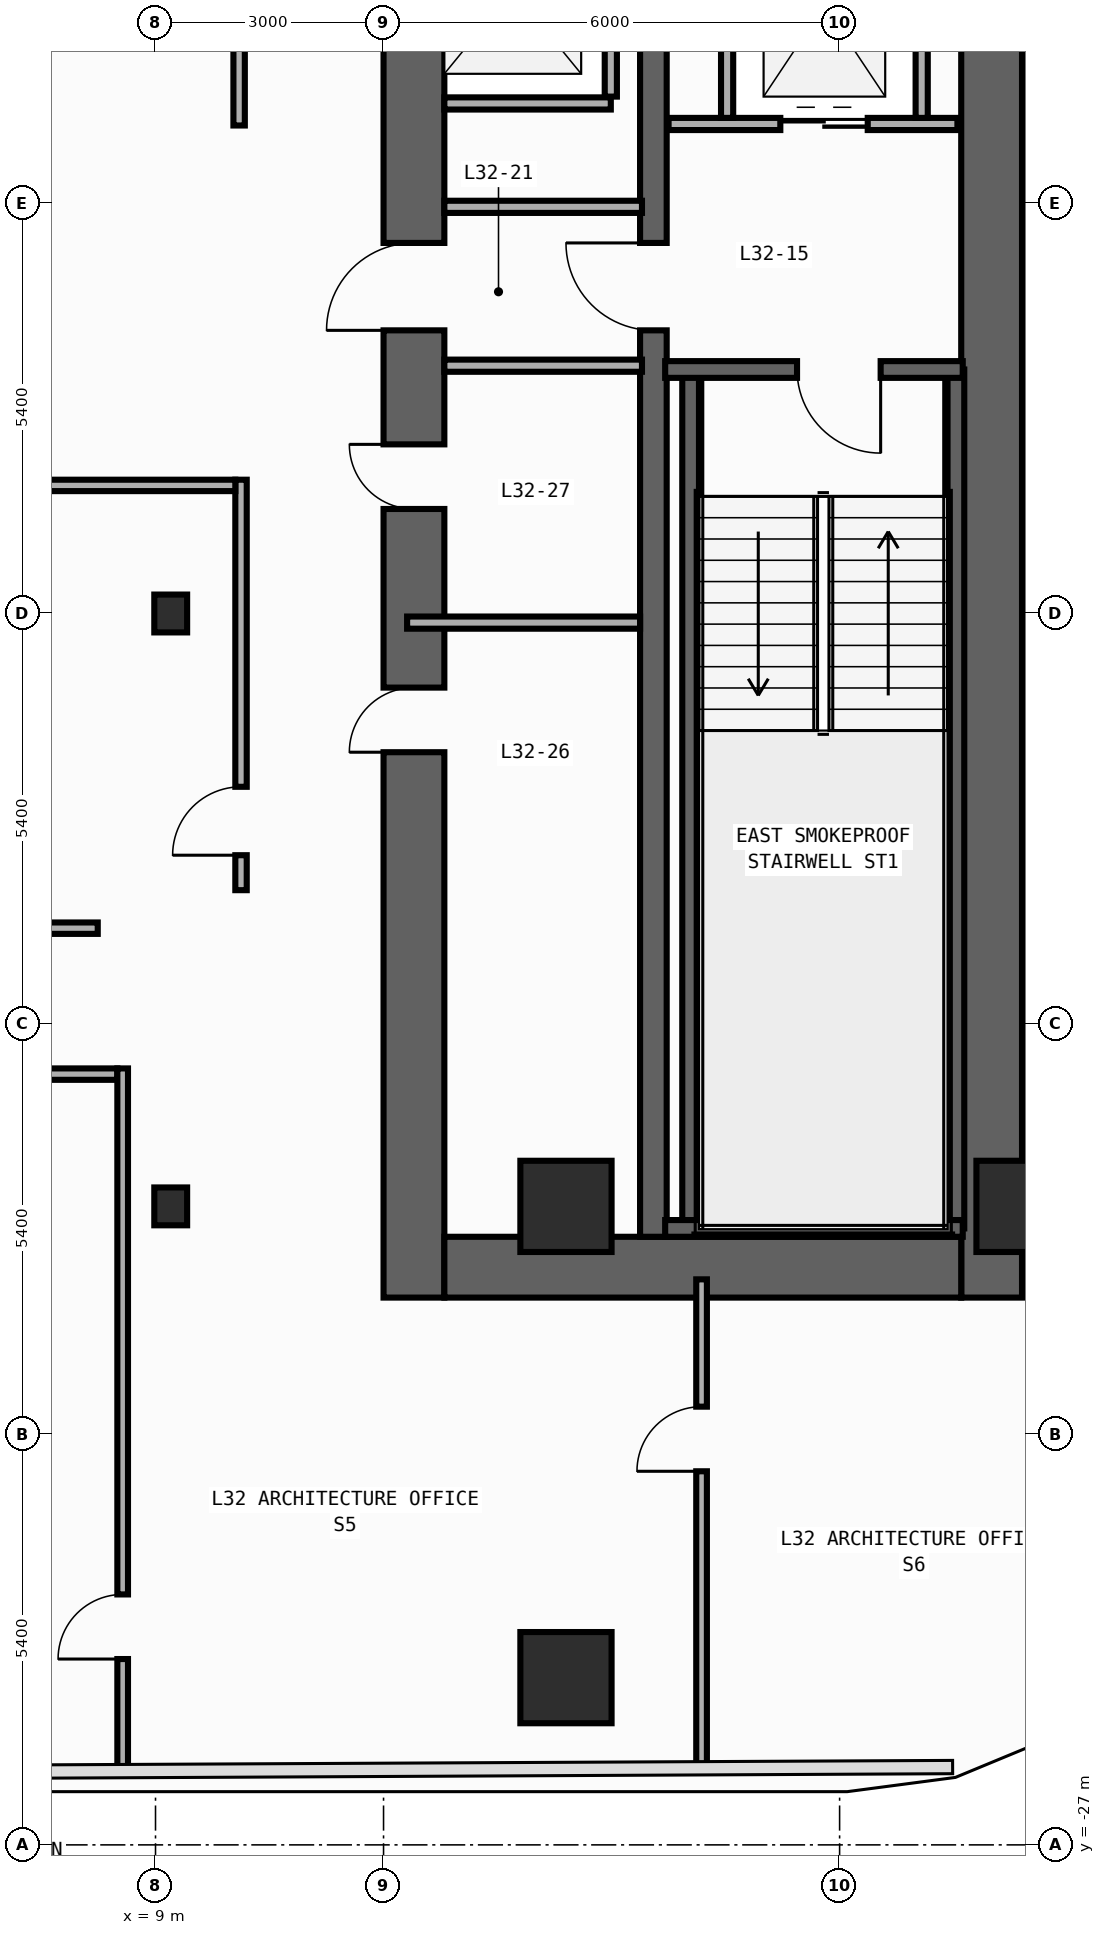
"""IFC4 building model, lengths in metres.
Left out: names, types, materials, properties, quantities, classifications, styles, units other than length and angle.
Written with IfcOpenShell. Run it as: python <this file> out.ifc"""

import sys

from ifc_helpers import new_model, si_unit, direction, frame, frame_2d, origin, origin_2d, place, context, subcontext, project, spatial, rectangle, i_section, extrude, element, fill, save


model = new_model("IFC4")
c1 = context("Model", 3, precision=1e-05, world=origin(), true_north=direction((0.0, 1.0)))
c2 = subcontext(c1, "Body", "Model", "MODEL_VIEW")
j1 = project(units=[si_unit("LENGTHUNIT", "METRE"), si_unit("PLANEANGLEUNIT", "RADIAN")], contexts=[c1])
p1 = place(None, origin())
s1 = spatial("IfcSite", under=j1, at=p1, CompositionType="ELEMENT")
p2 = place(p1, origin())
s2 = spatial("IfcBuilding", under=s1, at=p2, CompositionType="ELEMENT")
p3 = place(p2, frame((0.0, 0.0, 139.4)))
s3 = spatial("IfcBuildingStorey", under=s2, at=p3, CompositionType="ELEMENT", Elevation=139.4)
p4 = place(p3, frame((12.4, -19.8, 0.0), z_axis=(0.0, 0.0, 1.0), x_axis=(0.0, 1.0, 0.0)))
e1 = element("IfcWall", 1, at=p4, inside=s3, PredefinedType="SHEAR", context=c2, shape_type="SweptSolid", body=[
    extrude(rectangle(XDim=27.0, YDim=0.8, at=frame_2d((13.5, 0.0))), origin(), (0.0, 0.0, 1.0), 3.94),
])
p5 = place(p4, frame((23.05, 0.0, 0.0)))
e2 = element("IfcOpeningElement", 2, at=p5, cuts=e1, PredefinedType="OPENING", context=c2, shape_type="SweptSolid", body=[
    extrude(rectangle(XDim=1.1, YDim=2.2, at=frame_2d((0.55, 1.1))), frame((0.0, 0.41, 0.0), z_axis=(0.0, -1.0, 0.0), x_axis=(1.0, 0.0, 0.0)), (0.0, 0.0, 1.0), 0.82),
])
p6 = place(p4, frame((19.85, 0.0, 0.0)))
e3 = element("IfcOpeningElement", 3, at=p6, cuts=e1, PredefinedType="OPENING", context=c2, shape_type="SweptSolid", body=[
    extrude(rectangle(XDim=1.1, YDim=2.2, at=frame_2d((0.55, 1.1))), frame((0.0, 0.41, 0.0), z_axis=(0.0, -1.0, 0.0), x_axis=(1.0, 0.0, 0.0)), (0.0, 0.0, 1.0), 0.82),
])
p7 = place(p4, frame((16.65, 0.0, 0.0)))
e4 = element("IfcOpeningElement", 4, at=p7, cuts=e1, PredefinedType="OPENING", context=c2, shape_type="SweptSolid", body=[
    extrude(rectangle(XDim=1.1, YDim=2.2, at=frame_2d((0.55, 1.1))), frame((0.0, 0.41, 0.0), z_axis=(0.0, -1.0, 0.0), x_axis=(1.0, 0.0, 0.0)), (0.0, 0.0, 1.0), 0.82),
])
p8 = place(p4, frame((7.175, 0.0, 0.0)))
e5 = element("IfcOpeningElement", 5, at=p8, cuts=e1, PredefinedType="OPENING", context=c2, shape_type="SweptSolid", body=[
    extrude(rectangle(XDim=0.85, YDim=2.1, at=frame_2d((0.425, 1.05))), frame((0.0, 0.41, 0.0), z_axis=(0.0, -1.0, 0.0), x_axis=(1.0, 0.0, 0.0)), (0.0, 0.0, 1.0), 0.82),
])
p9 = place(p4, frame((10.375, 0.0, 0.0)))
e6 = element("IfcOpeningElement", 6, at=p9, cuts=e1, PredefinedType="OPENING", context=c2, shape_type="SweptSolid", body=[
    extrude(rectangle(XDim=0.85, YDim=2.1, at=frame_2d((0.425, 1.05))), frame((0.0, 0.41, 0.0), z_axis=(0.0, -1.0, 0.0), x_axis=(1.0, 0.0, 0.0)), (0.0, 0.0, 1.0), 0.82),
])
p10 = place(p4, frame((12.725, 0.0, 0.0)))
e7 = element("IfcOpeningElement", 7, at=p10, cuts=e1, PredefinedType="OPENING", context=c2, shape_type="SweptSolid", body=[
    extrude(rectangle(XDim=1.15, YDim=2.2, at=frame_2d((0.575, 1.1))), frame((0.0, 0.41, 0.0), z_axis=(0.0, -1.0, 0.0), x_axis=(1.0, 0.0, 0.0)), (0.0, 0.0, 1.0), 0.82),
])
p11 = place(p4, frame((25.125, 0.0, 0.0)))
e8 = element("IfcOpeningElement", 8, at=p11, cuts=e1, PredefinedType="OPENING", context=c2, shape_type="SweptSolid", body=[
    extrude(rectangle(XDim=0.85, YDim=2.1, at=frame_2d((0.425, 1.05))), frame((0.0, 0.41, 0.0), z_axis=(0.0, -1.0, 0.0), x_axis=(1.0, 0.0, 0.0)), (0.0, 0.0, 1.0), 0.82),
])
p12 = place(p3, frame((20.0, -19.8, 0.0), z_axis=(0.0, 0.0, 1.0), x_axis=(0.0, 1.0, 0.0)))
e9 = element("IfcWall", 9, at=p12, inside=s3, PredefinedType="SHEAR", context=c2, shape_type="SweptSolid", body=[
    extrude(rectangle(XDim=27.0, YDim=0.8, at=frame_2d((13.5, 0.0))), origin(), (0.0, 0.0, 1.0), 3.94),
])
p13 = place(p3, frame((12.8, -19.4, 0.0), z_axis=(0.0, 0.0, 1.0), x_axis=(1.0, 0.0, 0.0)))
e10 = element("IfcWall", 10, at=p13, inside=s3, PredefinedType="SHEAR", context=c2, shape_type="SweptSolid", body=[
    extrude(rectangle(XDim=6.8, YDim=0.8, at=frame_2d((3.4, 0.0))), origin(), (0.0, 0.0, 1.0), 3.94),
])
p14 = place(p3, frame((15.55, -19.0, 0.0), z_axis=(0.0, 0.0, 1.0), x_axis=(0.0, 1.0, 0.0)))
e11 = element("IfcWall", 11, at=p14, inside=s3, PredefinedType="SHEAR", context=c2, shape_type="SweptSolid", body=[
    extrude(rectangle(XDim=25.4, YDim=0.35, at=frame_2d((12.7, 0.0))), origin(), (0.0, 0.0, 1.0), 3.94),
])
p15 = place(p14, frame((11.925, 0.0, 0.0)))
e12 = element("IfcOpeningElement", 12, at=p15, cuts=e11, PredefinedType="OPENING", context=c2, shape_type="SweptSolid", body=[
    extrude(rectangle(XDim=1.15, YDim=2.2, at=frame_2d((0.575, 1.1))), frame((0.0, 0.185, 0.0), z_axis=(0.0, -1.0, 0.0), x_axis=(1.0, 0.0, 0.0)), (0.0, 0.0, 1.0), 0.37),
])
p16 = place(p14, frame((24.325, 0.0, 0.0)))
e13 = element("IfcOpeningElement", 13, at=p16, cuts=e11, PredefinedType="OPENING", context=c2, shape_type="SweptSolid", body=[
    extrude(rectangle(XDim=0.85, YDim=2.1, at=frame_2d((0.425, 1.05))), frame((0.0, 0.185, 0.0), z_axis=(0.0, -1.0, 0.0), x_axis=(1.0, 0.0, 0.0)), (0.0, 0.0, 1.0), 0.37),
])
for number, where, z_axis, x_axis in (
    (14, (16.04, -18.89, 0.0), (0.0, 0.0, 1.0), (0.0, 1.0, 0.0)),
    (15, (19.53, -18.89, 0.0), (0.0, 0.0, 1.0), (0.0, 1.0, 0.0)),
):
    element("IfcWall", number, at=place(p3, frame(where, z_axis=z_axis, x_axis=x_axis)), inside=s3, PredefinedType="SHEAR", context=c2, shape_type="SweptSolid", body=[
        extrude(rectangle(XDim=11.3, YDim=0.22, at=frame_2d((5.65, 0.0))), origin(), (0.0, 0.0, 1.0), 3.94),
    ])
p17 = place(p3, frame((15.705, -18.89, 0.0), z_axis=(0.0, 0.0, 1.0), x_axis=(1.0, 0.0, 0.0)))
e16 = element("IfcWall", 16, at=p17, inside=s3, PredefinedType="SHEAR", context=c2, shape_type="SweptSolid", body=[
    extrude(rectangle(XDim=3.915, YDim=0.22, at=frame_2d((1.958, 0.0))), origin(), (0.0, 0.0, 1.0), 3.94),
])
p18 = place(p3, frame((19.62, -7.59, 0.0), z_axis=(0.0, 0.0, 1.0), x_axis=(-1.0, 0.0, 0.0)))
e17 = element("IfcWall", 17, at=p18, inside=s3, PredefinedType="SHEAR", context=c2, shape_type="SweptSolid", body=[
    extrude(rectangle(XDim=3.915, YDim=0.22, at=frame_2d((1.958, 0.0))), origin(), (0.0, 0.0, 1.0), 3.94),
])
p19 = place(p18, frame((1.08, 0.0, 0.0)))
e18 = element("IfcOpeningElement", 18, at=p19, cuts=e17, PredefinedType="OPENING", context=c2, shape_type="SweptSolid", body=[
    extrude(rectangle(XDim=1.1, YDim=2.2, at=frame_2d((0.55, 1.1))), frame((0.0, 0.12, 0.0), z_axis=(0.0, -1.0, 0.0), x_axis=(1.0, 0.0, 0.0)), (0.0, 0.0, 1.0), 0.24),
])
for number, where, z_axis, x_axis in (
    (19, (9.2, -18.6, 0.0), (0.0, 0.0, 1.0), (1.0, 0.0, 0.0)),
    (20, (9.2, -10.8, 0.0), (0.0, 0.0, 1.0), (1.0, 0.0, 0.0)),
):
    element("IfcColumn", number, at=place(p3, frame(where, z_axis=z_axis, x_axis=x_axis)), inside=s3, PredefinedType="COLUMN", context=c2, shape_type="SweptSolid", body=[
        extrude(i_section(OverallWidth=0.432, OverallDepth=0.498, WebThickness=0.045, FlangeThickness=0.07, FilletRadius=0.022, at=origin_2d()), origin(), (0.0, 0.0, 1.0), 4.2),
    ])
for number, where, z_axis, x_axis in (
    (21, (20.4, -18.6, 0.0), (0.0, 0.0, 1.0), (1.0, 0.0, 0.0)),
    (22, (14.4, -18.6, 0.0), (0.0, 0.0, 1.0), (1.0, 0.0, 0.0)),
    (23, (14.4, -24.8, 0.0), (0.0, 0.0, 1.0), (1.0, 0.0, 0.0)),
):
    element("IfcColumn", number, at=place(p3, frame(where, z_axis=z_axis, x_axis=x_axis)), inside=s3, PredefinedType="COLUMN", context=c2, shape_type="SweptSolid", body=[
        extrude(rectangle(XDim=1.2, YDim=1.2, at=origin_2d()), origin(), (0.0, 0.0, 1.0), 4.2),
    ])
p20 = place(p3, frame((12.8, -4.09, 0.0), z_axis=(0.0, 0.0, 1.0), x_axis=(1.0, 0.0, 0.0)))
e24 = element("IfcWall", 24, at=p20, inside=s3, PredefinedType="STANDARD", context=c2, shape_type="SweptSolid", body=[
    extrude(rectangle(XDim=2.19, YDim=0.16, at=frame_2d((1.095, 0.0))), origin(), (0.0, 0.0, 1.0), 3.94),
])
p21 = place(p3, frame((14.99, -4.0, 0.0), z_axis=(0.0, 0.0, 1.0), x_axis=(0.0, 1.0, 0.0)))
e25 = element("IfcWall", 25, at=p21, inside=s3, PredefinedType="STANDARD", context=c2, shape_type="SweptSolid", body=[
    extrude(rectangle(XDim=2.8, YDim=0.16, at=frame_2d((1.4, 0.0))), origin(), (0.0, 0.0, 1.0), 3.94),
])
p22 = place(p3, frame((15.75, -4.36, 0.0), z_axis=(0.0, 0.0, 1.0), x_axis=(1.0, 0.0, 0.0)))
e26 = element("IfcWall", 26, at=p22, inside=s3, PredefinedType="STANDARD", context=c2, shape_type="SweptSolid", body=[
    extrude(rectangle(XDim=3.8, YDim=0.16, at=frame_2d((1.9, 0.0))), origin(), (0.0, 0.0, 1.0), 3.94),
])
p23 = place(p22, frame((1.47, 0.0, 0.0)))
e27 = element("IfcOpeningElement", 27, at=p23, cuts=e26, PredefinedType="OPENING", context=c2, shape_type="SweptSolid", body=[
    extrude(rectangle(XDim=1.15, YDim=2.2, at=frame_2d((0.575, 1.1))), frame((0.0, 0.09, 0.0), z_axis=(0.0, -1.0, 0.0), x_axis=(1.0, 0.0, 0.0)), (0.0, 0.0, 1.0), 0.18),
])
for number, where, z_axis, x_axis in (
    (28, (16.52, -4.28, 0.0), (0.0, 0.0, 1.0), (0.0, 1.0, 0.0)),
    (29, (19.08, -4.28, 0.0), (0.0, 0.0, 1.0), (0.0, 1.0, 0.0)),
):
    element("IfcWall", number, at=place(p3, frame(where, z_axis=z_axis, x_axis=x_axis)), inside=s3, PredefinedType="STANDARD", context=c2, shape_type="SweptSolid", body=[
        extrude(rectangle(XDim=2.98, YDim=0.16, at=frame_2d((1.49, 0.0))), origin(), (0.0, 0.0, 1.0), 3.94),
    ])
for number, where, z_axis, x_axis in (
    (30, (12.8, -5.45, 0.0), (0.0, 0.0, 1.0), (1.0, 0.0, 0.0)),
    (31, (12.8, -7.54, 0.0), (0.0, 0.0, 1.0), (1.0, 0.0, 0.0)),
):
    element("IfcWall", number, at=place(p3, frame(where, z_axis=z_axis, x_axis=x_axis)), inside=s3, PredefinedType="STANDARD", context=c2, shape_type="SweptSolid", body=[
        extrude(rectangle(XDim=2.6, YDim=0.16, at=frame_2d((1.3, 0.0))), origin(), (0.0, 0.0, 1.0), 3.94),
    ])
p24 = place(p3, frame((12.31, -10.92, 0.0), z_axis=(0.0, 0.0, 1.0), x_axis=(1.0, 0.0, 0.0)))
e32 = element("IfcWall", 32, at=p24, inside=s3, PredefinedType="PARTITIONING", context=c2, shape_type="SweptSolid", body=[
    extrude(rectangle(XDim=3.065, YDim=0.16, at=frame_2d((1.532, 0.0))), origin(), (0.0, 0.0, 1.0), 3.24),
])
p25 = place(p3, frame((10.1, -4.38, 0.0), z_axis=(0.0, 0.0, 1.0), x_axis=(0.0, 1.0, 0.0)))
e33 = element("IfcWall", 33, at=p25, inside=s3, PredefinedType="PARTITIONING", context=c2, shape_type="SweptSolid", body=[
    extrude(rectangle(XDim=10.375, YDim=0.15, at=frame_2d((5.188, 0.0))), origin(), (0.0, 0.0, 1.0), 3.94),
])
p26 = place(p25, frame((9.015, 0.0, 0.0)))
e34 = element("IfcOpeningElement", 34, at=p26, cuts=e33, PredefinedType="OPENING", context=c2, shape_type="SweptSolid", body=[
    extrude(rectangle(XDim=0.9, YDim=2.15, at=frame_2d((0.45, 1.075))), frame((0.0, 0.085, 0.0), z_axis=(0.0, -1.0, 0.0), x_axis=(1.0, 0.0, 0.0)), (0.0, 0.0, 1.0), 0.17),
])
p27 = place(p3, frame((10.125, -14.44, 0.0), z_axis=(0.0, 0.0, 1.0), x_axis=(0.0, 1.0, 0.0)))
e35 = element("IfcWall", 35, at=p27, inside=s3, PredefinedType="PARTITIONING", context=c2, shape_type="SweptSolid", body=[
    extrude(rectangle(XDim=5.4, YDim=0.15, at=frame_2d((2.7, 0.0))), origin(), (0.0, 0.0, 1.0), 3.94),
])
p28 = place(p27, frame((0.46, 0.0, 0.0)))
e36 = element("IfcOpeningElement", 36, at=p28, cuts=e35, PredefinedType="OPENING", context=c2, shape_type="SweptSolid", body=[
    extrude(rectangle(XDim=0.9, YDim=2.15, at=frame_2d((0.45, 1.075))), frame((0.0, 0.085, 0.0), z_axis=(0.0, -1.0, 0.0), x_axis=(1.0, 0.0, 0.0)), (0.0, 0.0, 1.0), 0.17),
])
p29 = place(p3, frame((-0.015, -9.115, 0.0), z_axis=(0.0, 0.0, 1.0), x_axis=(1.0, 0.0, 0.0)))
e37 = element("IfcWall", 37, at=p29, inside=s3, PredefinedType="PARTITIONING", context=c2, shape_type="SweptSolid", body=[
    extrude(rectangle(XDim=10.065, YDim=0.15, at=frame_2d((5.032, 0.0))), origin(), (0.0, 0.0, 1.0), 3.94),
])
p30 = place(p29, frame((0.46, 0.0, 0.0)))
e38 = element("IfcOpeningElement", 38, at=p30, cuts=e37, PredefinedType="OPENING", context=c2, shape_type="SweptSolid", body=[
    extrude(rectangle(XDim=0.9, YDim=2.15, at=frame_2d((0.45, 1.075))), frame((0.0, 0.085, 0.0), z_axis=(0.0, -1.0, 0.0), x_axis=(1.0, 0.0, 0.0)), (0.0, 0.0, 1.0), 0.17),
])
p31 = place(p3, frame((0.952, -16.86, 0.0), z_axis=(0.0, 0.0, 1.0), x_axis=(1.0, 0.0, 0.0)))
e39 = element("IfcWall", 39, at=p31, inside=s3, PredefinedType="PARTITIONING", context=c2, shape_type="SweptSolid", body=[
    extrude(rectangle(XDim=7.546, YDim=0.15, at=frame_2d((3.773, 0.0))), origin(), (0.0, 0.0, 1.0), 3.94),
])
p32 = place(p31, frame((5.726, 0.0, 0.0)))
e40 = element("IfcOpeningElement", 40, at=p32, cuts=e39, PredefinedType="OPENING", context=c2, shape_type="SweptSolid", body=[
    extrude(rectangle(XDim=0.9, YDim=2.15, at=frame_2d((0.45, 1.075))), frame((0.0, 0.085, 0.0), z_axis=(0.0, -1.0, 0.0), x_axis=(1.0, 0.0, 0.0)), (0.0, 0.0, 1.0), 0.17),
])
p33 = place(p3, frame((-0.015, -14.94, 0.0), z_axis=(0.0, 0.0, 1.0), x_axis=(1.0, 0.0, 0.0)))
e41 = element("IfcWall", 41, at=p33, inside=s3, PredefinedType="PARTITIONING", context=c2, shape_type="SweptSolid", body=[
    extrude(rectangle(XDim=8.255, YDim=0.15, at=frame_2d((4.127, 0.0))), origin(), (0.0, 0.0, 1.0), 3.94),
])
p34 = place(p33, frame((6.694, 0.0, 0.0)))
e42 = element("IfcOpeningElement", 42, at=p34, cuts=e41, PredefinedType="OPENING", context=c2, shape_type="SweptSolid", body=[
    extrude(rectangle(XDim=0.9, YDim=2.15, at=frame_2d((0.45, 1.075))), frame((0.0, 0.085, 0.0), z_axis=(0.0, -1.0, 0.0), x_axis=(1.0, 0.0, 0.0)), (0.0, 0.0, 1.0), 0.17),
])
p35 = place(p3, frame((8.568, -26.025, 0.0), z_axis=(0.0, 0.0, 1.0), x_axis=(0.0, 1.0, 0.0)))
e43 = element("IfcWall", 43, at=p35, inside=s3, PredefinedType="PARTITIONING", context=c2, shape_type="SweptSolid", body=[
    extrude(rectangle(XDim=9.24, YDim=0.14, at=frame_2d((4.62, 0.0))), origin(), (0.0, 0.0, 1.0), 3.94),
])
p36 = place(p35, frame((1.469, 0.0, 0.0)))
e44 = element("IfcOpeningElement", 44, at=p36, cuts=e43, PredefinedType="OPENING", context=c2, shape_type="SweptSolid", body=[
    extrude(rectangle(XDim=0.85, YDim=2.1, at=frame_2d((0.425, 1.05))), frame((0.0, 0.08, 0.0), z_axis=(0.0, -1.0, 0.0), x_axis=(1.0, 0.0, 0.0)), (0.0, 0.0, 1.0), 0.16),
])
p37 = place(p3, frame((16.184, -25.987, 0.0), z_axis=(0.0, 0.0, 1.0), x_axis=(0.0, 1.0, 0.0)))
e45 = element("IfcWall", 45, at=p37, inside=s3, PredefinedType="PARTITIONING", context=c2, shape_type="SweptSolid", body=[
    extrude(rectangle(XDim=6.427, YDim=0.14, at=frame_2d((3.214, 0.0))), origin(), (0.0, 0.0, 1.0), 3.94),
])
p38 = place(p37, frame((3.902, 0.0, 0.0)))
e46 = element("IfcOpeningElement", 46, at=p38, cuts=e45, PredefinedType="OPENING", context=c2, shape_type="SweptSolid", body=[
    extrude(rectangle(XDim=0.85, YDim=2.1, at=frame_2d((0.425, 1.05))), frame((0.0, 0.08, 0.0), z_axis=(0.0, -1.0, 0.0), x_axis=(1.0, 0.0, 0.0)), (0.0, 0.0, 1.0), 0.16),
])
p39 = place(p19, origin())
e47 = element("IfcDoor", 47, at=p39, inside=s3, OperationType="SINGLE_SWING_LEFT", PredefinedType="DOOR", context=c2, shape_type="SweptSolid", body=[
    extrude(rectangle(XDim=1.1, YDim=2.2, at=frame_2d((0.55, 1.1))), frame((0.0, 0.025, 0.0), z_axis=(0.0, -1.0, 0.0), x_axis=(1.0, 0.0, 0.0)), (0.0, 0.0, 1.0), 0.05),
])
fill(e18, e47)
p40 = place(p8, origin())
e48 = element("IfcDoor", 48, at=p40, inside=s3, OperationType="SINGLE_SWING_LEFT", PredefinedType="DOOR", context=c2, shape_type="SweptSolid", body=[
    extrude(rectangle(XDim=0.85, YDim=2.1, at=frame_2d((0.425, 1.05))), frame((0.0, 0.025, 0.0), z_axis=(0.0, -1.0, 0.0), x_axis=(1.0, 0.0, 0.0)), (0.0, 0.0, 1.0), 0.05),
])
fill(e5, e48)
p41 = place(p9, origin())
e49 = element("IfcDoor", 49, at=p41, inside=s3, OperationType="SINGLE_SWING_RIGHT", PredefinedType="DOOR", context=c2, shape_type="SweptSolid", body=[
    extrude(rectangle(XDim=0.85, YDim=2.1, at=frame_2d((0.425, 1.05))), frame((0.0, 0.025, 0.0), z_axis=(0.0, -1.0, 0.0), x_axis=(1.0, 0.0, 0.0)), (0.0, 0.0, 1.0), 0.05),
])
fill(e6, e49)
p42 = place(p10, origin())
e50 = element("IfcDoor", 50, at=p42, inside=s3, OperationType="SINGLE_SWING_LEFT", PredefinedType="DOOR", context=c2, shape_type="SweptSolid", body=[
    extrude(rectangle(XDim=1.15, YDim=2.2, at=frame_2d((0.575, 1.1))), frame((0.0, 0.025, 0.0), z_axis=(0.0, -1.0, 0.0), x_axis=(1.0, 0.0, 0.0)), (0.0, 0.0, 1.0), 0.05),
])
fill(e7, e50)
p43 = place(p15, origin())
e51 = element("IfcDoor", 51, at=p43, inside=s3, OperationType="SINGLE_SWING_RIGHT", PredefinedType="DOOR", context=c2, shape_type="SweptSolid", body=[
    extrude(rectangle(XDim=1.15, YDim=2.2, at=frame_2d((0.575, 1.1))), frame((0.0, 0.025, 0.0), z_axis=(0.0, -1.0, 0.0), x_axis=(1.0, 0.0, 0.0)), (0.0, 0.0, 1.0), 0.05),
])
fill(e12, e51)
p44 = place(p23, origin())
e52 = element("IfcDoor", 52, at=p44, inside=s3, OperationType="DOUBLE_DOOR_SLIDING", PredefinedType="DOOR", context=c2, shape_type="SweptSolid", body=[
    extrude(rectangle(XDim=1.15, YDim=2.2, at=frame_2d((0.575, 1.1))), frame((0.0, 0.025, 0.0), z_axis=(0.0, -1.0, 0.0), x_axis=(1.0, 0.0, 0.0)), (0.0, 0.0, 1.0), 0.05),
])
fill(e27, e52)
p45 = place(p28, origin())
e53 = element("IfcDoor", 53, at=p45, inside=s3, OperationType="SINGLE_SWING_LEFT", PredefinedType="DOOR", context=c2, shape_type="SweptSolid", body=[
    extrude(rectangle(XDim=0.9, YDim=2.15, at=frame_2d((0.45, 1.075))), frame((0.0, 0.025, 0.0), z_axis=(0.0, -1.0, 0.0), x_axis=(1.0, 0.0, 0.0)), (0.0, 0.0, 1.0), 0.05),
])
fill(e36, e53)
p46 = place(p36, origin())
e54 = element("IfcDoor", 54, at=p46, inside=s3, OperationType="SINGLE_SWING_LEFT", PredefinedType="DOOR", context=c2, shape_type="SweptSolid", body=[
    extrude(rectangle(XDim=0.85, YDim=2.1, at=frame_2d((0.425, 1.05))), frame((0.0, 0.025, 0.0), z_axis=(0.0, -1.0, 0.0), x_axis=(1.0, 0.0, 0.0)), (0.0, 0.0, 1.0), 0.05),
])
fill(e44, e54)
p47 = place(p38, origin())
e55 = element("IfcDoor", 55, at=p47, inside=s3, OperationType="SINGLE_SWING_LEFT", PredefinedType="DOOR", context=c2, shape_type="SweptSolid", body=[
    extrude(rectangle(XDim=0.85, YDim=2.1, at=frame_2d((0.425, 1.05))), frame((0.0, 0.025, 0.0), z_axis=(0.0, -1.0, 0.0), x_axis=(1.0, 0.0, 0.0)), (0.0, 0.0, 1.0), 0.05),
])
fill(e46, e55)
save(model, sys.argv[1])
